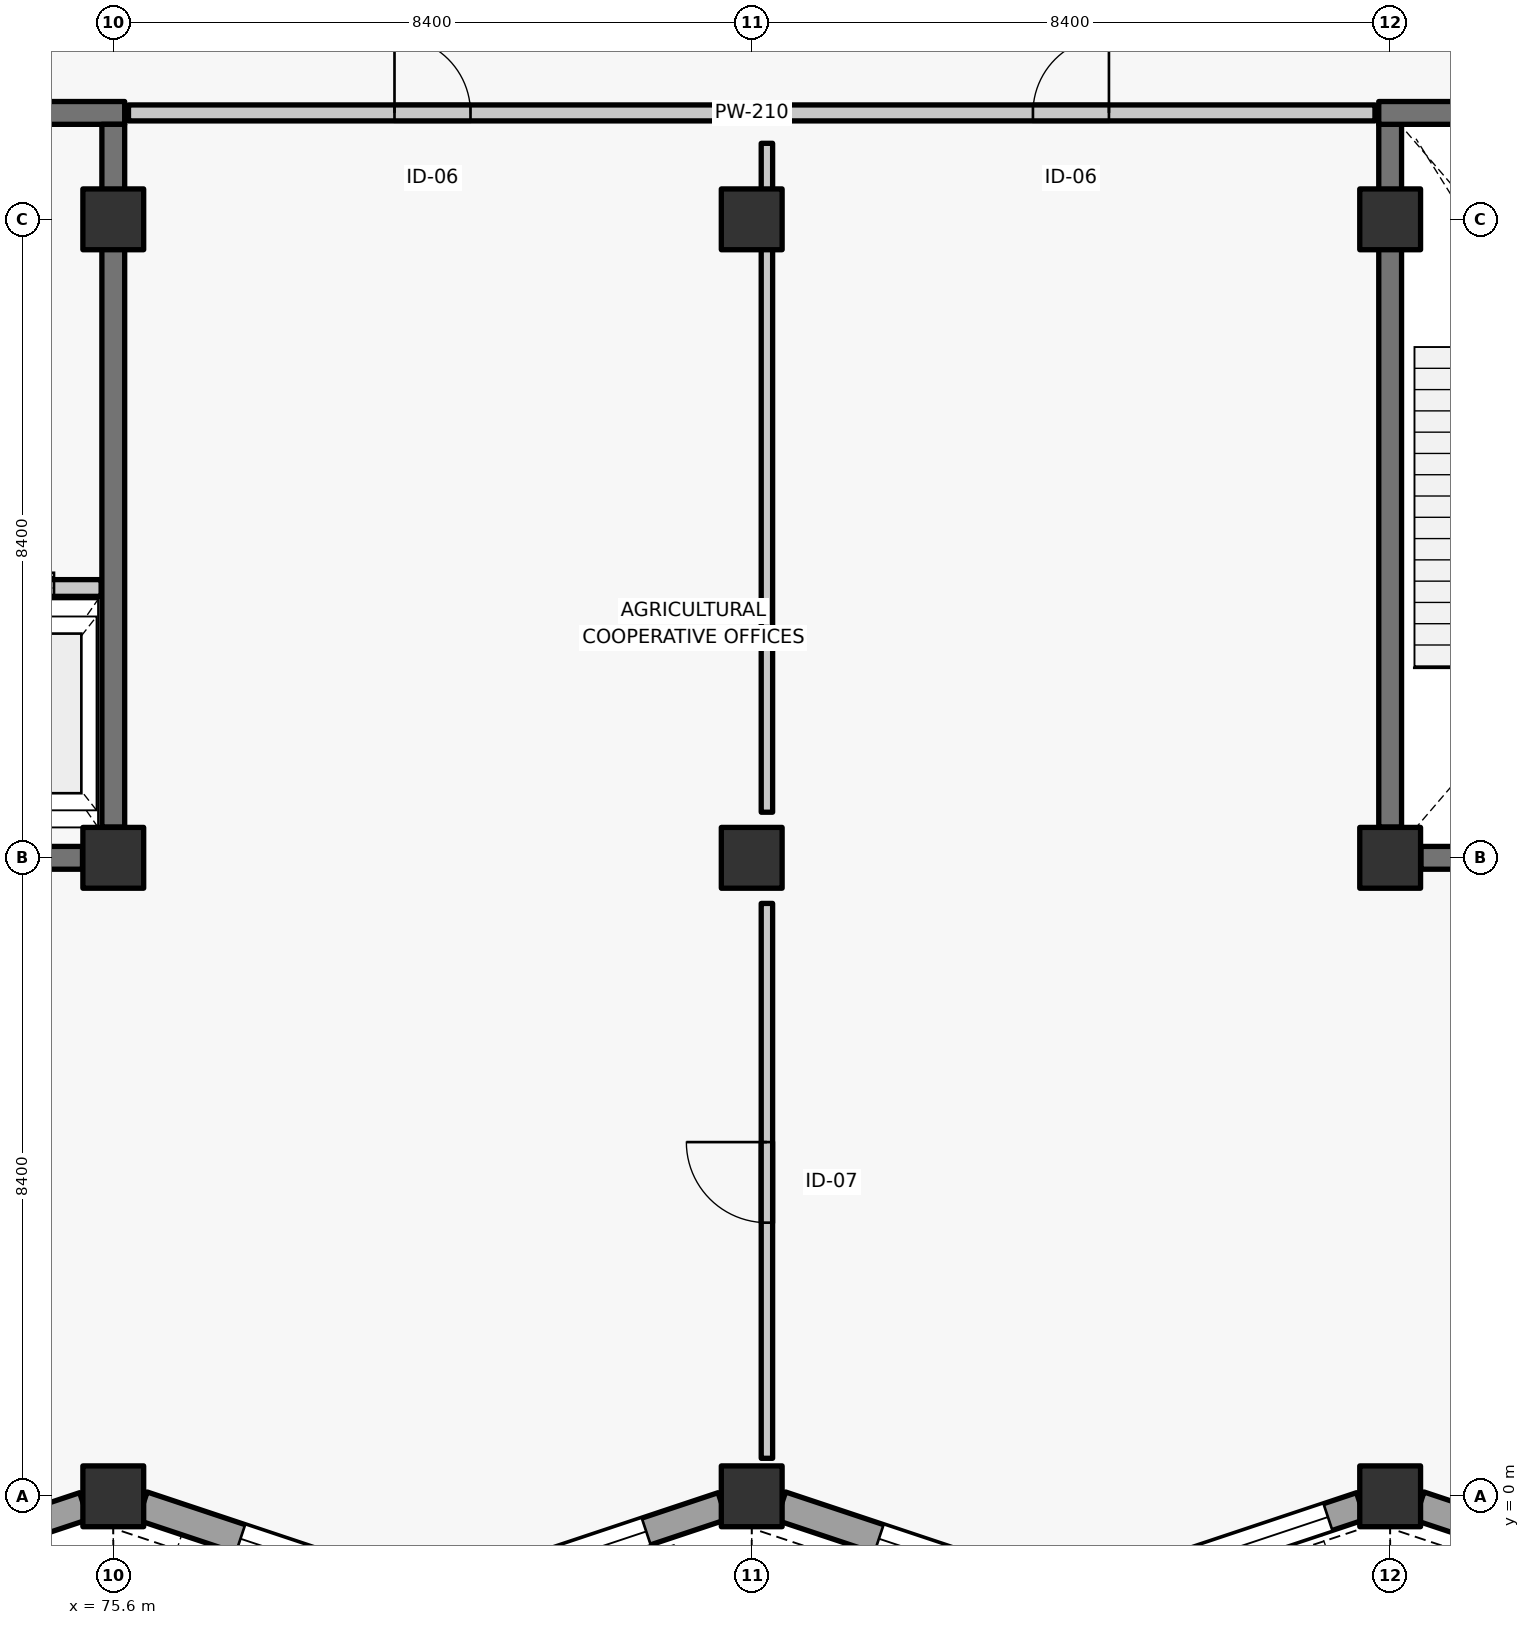
"""IFC4 building model, lengths in metres.
Left out: names, types, materials, properties, quantities, classifications, styles, units other than length and angle.
Written with IfcOpenShell. Run it as: python <this file> out.ifc"""

import sys

from ifc_helpers import new_model, si_unit, direction, frame, frame_2d, origin, origin_2d, place, context, subcontext, project, spatial, rectangle, extrude, element, fill, save


model = new_model("IFC4")
c1 = context("Model", 3, precision=1e-05, world=origin(), true_north=direction((0.0, 1.0)))
c2 = subcontext(c1, "Body", "Model", "MODEL_VIEW")
j1 = project(units=[si_unit("LENGTHUNIT", "METRE"), si_unit("PLANEANGLEUNIT", "RADIAN")], contexts=[c1])
p1 = place(None, origin())
s1 = spatial("IfcSite", under=j1, at=p1, CompositionType="ELEMENT")
p2 = place(p1, origin())
s2 = spatial("IfcBuilding", under=s1, at=p2, CompositionType="ELEMENT")
p3 = place(p2, frame((0.0, 0.0, 6.0)))
s3 = spatial("IfcBuildingStorey", under=s2, at=p3, CompositionType="ELEMENT", Elevation=6.0)
for number, where, z_axis, x_axis in (
    (1, (75.6, 0.0, 0.0), (0.0, 0.0, 1.0), (1.0, 0.0, 0.0)),
    (2, (75.6, 8.4, 0.0), (0.0, 0.0, 1.0), (1.0, 0.0, 0.0)),
    (3, (75.6, 16.8, 0.0), (0.0, 0.0, 1.0), (1.0, 0.0, 0.0)),
    (4, (84.0, 0.0, 0.0), (0.0, 0.0, 1.0), (1.0, 0.0, 0.0)),
    (5, (84.0, 8.4, 0.0), (0.0, 0.0, 1.0), (1.0, 0.0, 0.0)),
    (6, (84.0, 16.8, 0.0), (0.0, 0.0, 1.0), (1.0, 0.0, 0.0)),
    (7, (92.4, 0.0, 0.0), (0.0, 0.0, 1.0), (1.0, 0.0, 0.0)),
    (8, (92.4, 8.4, 0.0), (0.0, 0.0, 1.0), (1.0, 0.0, 0.0)),
    (9, (92.4, 16.8, 0.0), (0.0, 0.0, 1.0), (1.0, 0.0, 0.0)),
):
    element("IfcColumn", number, at=place(p3, frame(where, z_axis=z_axis, x_axis=x_axis)), inside=s3, PredefinedType="COLUMN", context=c2, shape_type="SweptSolid", body=[
        extrude(rectangle(XDim=0.8, YDim=0.8, at=origin_2d()), origin(), (0.0, 0.0, 1.0), 5.4),
    ])
p4 = place(p3, frame((75.216, -0.128, 0.0), z_axis=(0.0, 0.0, 1.0), x_axis=(-0.94870150572, -0.316173137767, 0.0)))
e10 = element("IfcWall", 10, at=p4, inside=s3, PredefinedType="SOLIDWALL", context=c2, shape_type="SweptSolid", body=[
    extrude(rectangle(XDim=4.022, YDim=0.37, at=frame_2d((2.011, 0.0))), origin(), (0.0, 0.0, 1.0), 5.12),
])
p5 = place(p4, frame((0.948, 0.0, 0.9)))
e11 = element("IfcOpeningElement", 11, at=p5, cuts=e10, PredefinedType="OPENING", context=c2, shape_type="SweptSolid", body=[
    extrude(rectangle(XDim=1.72, YDim=1.7, at=frame_2d((0.86, 0.85))), frame((0.0, 0.195, 0.0), z_axis=(0.0, -1.0, 0.0), x_axis=(1.0, 0.0, 0.0)), (0.0, 0.0, 1.0), 0.39),
])
p6 = place(p3, frame((79.8, -1.4, 0.0), z_axis=(0.0, 0.0, 1.0), x_axis=(-0.94870150572, 0.316173137767, 0.0)))
e12 = element("IfcWall", 12, at=p6, inside=s3, PredefinedType="SOLIDWALL", context=c2, shape_type="SweptSolid", body=[
    extrude(rectangle(XDim=4.022, YDim=0.39, at=frame_2d((2.011, 0.0))), origin(), (0.0, 0.0, 1.0), 5.12),
])
p7 = place(p6, frame((1.763, 0.0, 0.9)))
e13 = element("IfcOpeningElement", 13, at=p7, cuts=e12, PredefinedType="OPENING", context=c2, shape_type="SweptSolid", body=[
    extrude(rectangle(XDim=0.9, YDim=2.1, at=frame_2d((0.45, 1.05))), frame((0.0, 0.205, 0.0), z_axis=(0.0, -1.0, 0.0), x_axis=(1.0, 0.0, 0.0)), (0.0, 0.0, 1.0), 0.41),
])
p8 = place(p3, frame((83.616, -0.128, 0.0), z_axis=(0.0, 0.0, 1.0), x_axis=(-0.948695437545, -0.316191345203, 0.0)))
e14 = element("IfcWall", 14, at=p8, inside=s3, PredefinedType="SOLIDWALL", context=c2, shape_type="SweptSolid", body=[
    extrude(rectangle(XDim=4.022, YDim=0.37, at=frame_2d((2.011, 0.0))), origin(), (0.0, 0.0, 1.0), 5.12),
])
p9 = place(p8, frame((1.058, 0.0, 0.9)))
e15 = element("IfcOpeningElement", 15, at=p9, cuts=e14, PredefinedType="OPENING", context=c2, shape_type="SweptSolid", body=[
    extrude(rectangle(XDim=1.5, YDim=2.15, at=frame_2d((0.75, 1.075))), frame((0.0, 0.195, 0.0), z_axis=(0.0, -1.0, 0.0), x_axis=(1.0, 0.0, 0.0)), (0.0, 0.0, 1.0), 0.39),
])
p10 = place(p3, frame((88.2, -1.4, 0.0), z_axis=(0.0, 0.0, 1.0), x_axis=(-0.948695437545, 0.316191345203, 0.0)))
e16 = element("IfcWall", 16, at=p10, inside=s3, PredefinedType="SOLIDWALL", context=c2, shape_type="SweptSolid", body=[
    extrude(rectangle(XDim=4.022, YDim=0.39, at=frame_2d((2.011, 0.0))), origin(), (0.0, 0.0, 1.0), 5.12),
])
p11 = place(p10, frame((1.763, 0.0, 0.9)))
e17 = element("IfcOpeningElement", 17, at=p11, cuts=e16, PredefinedType="OPENING", context=c2, shape_type="SweptSolid", body=[
    extrude(rectangle(XDim=0.9, YDim=2.1, at=frame_2d((0.45, 1.05))), frame((0.0, 0.205, 0.0), z_axis=(0.0, -1.0, 0.0), x_axis=(1.0, 0.0, 0.0)), (0.0, 0.0, 1.0), 0.41),
])
p12 = place(p3, frame((92.016, -0.128, 0.0), z_axis=(0.0, 0.0, 1.0), x_axis=(-0.94870150572, -0.316173137767, 0.0)))
e18 = element("IfcWall", 18, at=p12, inside=s3, PredefinedType="SOLIDWALL", context=c2, shape_type="SweptSolid", body=[
    extrude(rectangle(XDim=4.022, YDim=0.37, at=frame_2d((2.011, 0.0))), origin(), (0.0, 0.0, 1.0), 5.12),
])
p13 = place(p12, frame((0.458, 0.0, 0.9)))
e19 = element("IfcOpeningElement", 19, at=p13, cuts=e18, PredefinedType="OPENING", context=c2, shape_type="SweptSolid", body=[
    extrude(rectangle(XDim=2.7, YDim=1.75, at=frame_2d((1.35, 0.875))), frame((0.0, 0.195, 0.0), z_axis=(0.0, -1.0, 0.0), x_axis=(1.0, 0.0, 0.0)), (0.0, 0.0, 1.0), 0.39),
])
p14 = place(p3, frame((96.6, -1.4, 0.0), z_axis=(0.0, 0.0, 1.0), x_axis=(-0.94870150572, 0.316173137767, 0.0)))
e20 = element("IfcWall", 20, at=p14, inside=s3, PredefinedType="SOLIDWALL", context=c2, shape_type="SweptSolid", body=[
    extrude(rectangle(XDim=4.022, YDim=0.39, at=frame_2d((2.011, 0.0))), origin(), (0.0, 0.0, 1.0), 5.12),
])
p15 = place(p14, frame((1.763, 0.0, 0.9)))
e21 = element("IfcOpeningElement", 21, at=p15, cuts=e20, PredefinedType="OPENING", context=c2, shape_type="SweptSolid", body=[
    extrude(rectangle(XDim=0.9, YDim=2.1, at=frame_2d((0.45, 1.05))), frame((0.0, 0.205, 0.0), z_axis=(0.0, -1.0, 0.0), x_axis=(1.0, 0.0, 0.0)), (0.0, 0.0, 1.0), 0.41),
])
p16 = place(p3, frame((75.195, 8.4, 0.0), z_axis=(0.0, 0.0, 1.0), x_axis=(-1.0, 0.0, 0.0)))
e22 = element("IfcWall", 22, at=p16, inside=s3, PredefinedType="SHEAR", context=c2, shape_type="SweptSolid", body=[
    extrude(rectangle(XDim=7.59, YDim=0.3, at=frame_2d((3.795, 0.0))), origin(), (0.0, 0.0, 1.0), 5.12),
])
p17 = place(p3, frame((67.05, 18.2, 0.0), z_axis=(0.0, 0.0, 1.0), x_axis=(1.0, 0.0, 0.0)))
e23 = element("IfcWall", 23, at=p17, inside=s3, PredefinedType="SHEAR", context=c2, shape_type="SweptSolid", body=[
    extrude(rectangle(XDim=8.7, YDim=0.3, at=frame_2d((4.35, 0.0))), origin(), (0.0, 0.0, 1.0), 5.12),
])
p18 = place(p17, frame((5.57, 0.0, 0.0)))
e24 = element("IfcOpeningElement", 24, at=p18, cuts=e23, PredefinedType="OPENING", context=c2, shape_type="SweptSolid", body=[
    extrude(rectangle(XDim=1.96, YDim=2.2, at=frame_2d((0.98, 1.1))), frame((0.0, 0.16, 0.0), z_axis=(0.0, -1.0, 0.0), x_axis=(1.0, 0.0, 0.0)), (0.0, 0.0, 1.0), 0.32),
])
p19 = place(p3, frame((75.6, 18.05, 0.0), z_axis=(0.0, 0.0, 1.0), x_axis=(0.0, -1.0, 0.0)))
e25 = element("IfcWall", 25, at=p19, inside=s3, PredefinedType="SHEAR", context=c2, shape_type="SweptSolid", body=[
    extrude(rectangle(XDim=9.245, YDim=0.3, at=frame_2d((4.623, 0.0))), origin(), (0.0, 0.0, 1.0), 5.12),
])
p20 = place(p3, frame((73.1, 11.95, 0.0), z_axis=(0.0, 0.0, 1.0), x_axis=(1.0, 0.0, 0.0)))
e26 = element("IfcWall", 26, at=p20, inside=s3, PredefinedType="SOLIDWALL", context=c2, shape_type="SweptSolid", body=[
    extrude(rectangle(XDim=2.34, YDim=0.22, at=frame_2d((1.17, 0.0))), origin(), (0.0, 0.0, 1.0), 5.12),
])
p21 = place(p20, frame((0.62, 0.0, 0.0)))
e27 = element("IfcOpeningElement", 27, at=p21, cuts=e26, PredefinedType="OPENING", context=c2, shape_type="SweptSolid", body=[
    extrude(rectangle(XDim=1.1, YDim=2.2, at=frame_2d((0.55, 1.1))), frame((0.0, 0.12, 0.0), z_axis=(0.0, -1.0, 0.0), x_axis=(1.0, 0.0, 0.0)), (0.0, 0.0, 1.0), 0.24),
])
p22 = place(p3, frame((100.395, 8.4, 0.0), z_axis=(0.0, 0.0, 1.0), x_axis=(-1.0, 0.0, 0.0)))
e28 = element("IfcWall", 28, at=p22, inside=s3, PredefinedType="SHEAR", context=c2, shape_type="SweptSolid", body=[
    extrude(rectangle(XDim=7.59, YDim=0.3, at=frame_2d((3.795, 0.0))), origin(), (0.0, 0.0, 1.0), 5.12),
])
p23 = place(p3, frame((92.4, 8.805, 0.0), z_axis=(0.0, 0.0, 1.0), x_axis=(0.0, 1.0, 0.0)))
e29 = element("IfcWall", 29, at=p23, inside=s3, PredefinedType="SHEAR", context=c2, shape_type="SweptSolid", body=[
    extrude(rectangle(XDim=9.245, YDim=0.3, at=frame_2d((4.623, 0.0))), origin(), (0.0, 0.0, 1.0), 5.12),
])
p24 = place(p3, frame((92.25, 18.2, 0.0), z_axis=(0.0, 0.0, 1.0), x_axis=(1.0, 0.0, 0.0)))
e30 = element("IfcWall", 30, at=p24, inside=s3, PredefinedType="SHEAR", context=c2, shape_type="SweptSolid", body=[
    extrude(rectangle(XDim=8.7, YDim=0.3, at=frame_2d((4.35, 0.0))), origin(), (0.0, 0.0, 1.0), 5.12),
])
p25 = place(p24, frame((5.57, 0.0, 0.0)))
e31 = element("IfcOpeningElement", 31, at=p25, cuts=e30, PredefinedType="OPENING", context=c2, shape_type="SweptSolid", body=[
    extrude(rectangle(XDim=1.96, YDim=2.2, at=frame_2d((0.98, 1.1))), frame((0.0, 0.16, 0.0), z_axis=(0.0, -1.0, 0.0), x_axis=(1.0, 0.0, 0.0)), (0.0, 0.0, 1.0), 0.32),
])
p26 = place(p3, frame((75.8, 18.2, 0.0), z_axis=(0.0, 0.0, 1.0), x_axis=(1.0, 0.0, 0.0)))
e32 = element("IfcWall", 32, at=p26, inside=s3, PredefinedType="PARTITIONING", context=c2, shape_type="SweptSolid", body=[
    extrude(rectangle(XDim=16.4, YDim=0.21, at=frame_2d((8.2, 0.0))), origin(), (0.0, 0.0, 1.0), 5.12),
])
p27 = place(p26, frame((3.5, 0.0, 0.0)))
e33 = element("IfcOpeningElement", 33, at=p27, cuts=e32, PredefinedType="OPENING", context=c2, shape_type="SweptSolid", body=[
    extrude(rectangle(XDim=1.0, YDim=2.15, at=frame_2d((0.5, 1.075))), frame((0.0, 0.115, 0.0), z_axis=(0.0, -1.0, 0.0), x_axis=(1.0, 0.0, 0.0)), (0.0, 0.0, 1.0), 0.23),
])
p28 = place(p26, frame((11.9, 0.0, 0.0)))
e34 = element("IfcOpeningElement", 34, at=p28, cuts=e32, PredefinedType="OPENING", context=c2, shape_type="SweptSolid", body=[
    extrude(rectangle(XDim=1.0, YDim=2.15, at=frame_2d((0.5, 1.075))), frame((0.0, 0.115, 0.0), z_axis=(0.0, -1.0, 0.0), x_axis=(1.0, 0.0, 0.0)), (0.0, 0.0, 1.0), 0.23),
])
p29 = place(p3, frame((84.2, 0.5, 0.0), z_axis=(0.0, 0.0, 1.0), x_axis=(0.0, 1.0, 0.0)))
e35 = element("IfcWall", 35, at=p29, inside=s3, PredefinedType="PARTITIONING", context=c2, shape_type="SweptSolid", body=[
    extrude(rectangle(XDim=7.3, YDim=0.15, at=frame_2d((3.65, 0.0))), origin(), (0.0, 0.0, 1.0), 5.12),
])
p30 = place(p29, frame((3.1, 0.0, 0.0)))
e36 = element("IfcOpeningElement", 36, at=p30, cuts=e35, PredefinedType="OPENING", context=c2, shape_type="SweptSolid", body=[
    extrude(rectangle(XDim=1.06, YDim=2.18, at=frame_2d((0.53, 1.09))), frame((0.0, 0.085, 0.0), z_axis=(0.0, -1.0, 0.0), x_axis=(1.0, 0.0, 0.0)), (0.0, 0.0, 1.0), 0.17),
])
p31 = place(p3, frame((84.2, 9.0, 0.0), z_axis=(0.0, 0.0, 1.0), x_axis=(0.0, 1.0, 0.0)))
e37 = element("IfcWall", 37, at=p31, inside=s3, PredefinedType="PARTITIONING", context=c2, shape_type="SweptSolid", body=[
    extrude(rectangle(XDim=8.8, YDim=0.15, at=frame_2d((4.4, 0.0))), origin(), (0.0, 0.0, 1.0), 5.12),
])
p32 = place(p7, origin())
e38 = element("IfcWindow", 38, at=p32, inside=s3, PartitioningType="SINGLE_PANEL", PredefinedType="WINDOW", context=c2, shape_type="SweptSolid", body=[
    extrude(rectangle(XDim=0.9, YDim=2.1, at=frame_2d((0.45, 1.05))), frame((0.0, 0.03, 0.0), z_axis=(0.0, -1.0, 0.0), x_axis=(1.0, 0.0, 0.0)), (0.0, 0.0, 1.0), 0.06),
])
fill(e13, e38)
p33 = place(p9, origin())
e39 = element("IfcWindow", 39, at=p33, inside=s3, PartitioningType="SINGLE_PANEL", PredefinedType="WINDOW", context=c2, shape_type="SweptSolid", body=[
    extrude(rectangle(XDim=1.5, YDim=2.15, at=frame_2d((0.75, 1.075))), frame((0.0, 0.03, 0.0), z_axis=(0.0, -1.0, 0.0), x_axis=(1.0, 0.0, 0.0)), (0.0, 0.0, 1.0), 0.06),
])
fill(e15, e39)
p34 = place(p11, origin())
e40 = element("IfcWindow", 40, at=p34, inside=s3, PartitioningType="SINGLE_PANEL", PredefinedType="WINDOW", context=c2, shape_type="SweptSolid", body=[
    extrude(rectangle(XDim=0.9, YDim=2.1, at=frame_2d((0.45, 1.05))), frame((0.0, 0.03, 0.0), z_axis=(0.0, -1.0, 0.0), x_axis=(1.0, 0.0, 0.0)), (0.0, 0.0, 1.0), 0.06),
])
fill(e17, e40)
p35 = place(p13, origin())
e41 = element("IfcWindow", 41, at=p35, inside=s3, PartitioningType="SINGLE_PANEL", PredefinedType="WINDOW", context=c2, shape_type="SweptSolid", body=[
    extrude(rectangle(XDim=2.7, YDim=1.75, at=frame_2d((1.35, 0.875))), frame((0.0, 0.03, 0.0), z_axis=(0.0, -1.0, 0.0), x_axis=(1.0, 0.0, 0.0)), (0.0, 0.0, 1.0), 0.06),
])
fill(e19, e41)
p36 = place(p21, origin())
e42 = element("IfcDoor", 42, at=p36, inside=s3, OperationType="SLIDING_TO_RIGHT", PredefinedType="DOOR", context=c2, shape_type="SweptSolid", body=[
    extrude(rectangle(XDim=1.1, YDim=2.2, at=frame_2d((0.55, 1.1))), frame((0.0, 0.025, 0.0), z_axis=(0.0, -1.0, 0.0), x_axis=(1.0, 0.0, 0.0)), (0.0, 0.0, 1.0), 0.05),
])
fill(e27, e42)
p37 = place(p27, origin())
e43 = element("IfcDoor", 43, at=p37, inside=s3, OperationType="SINGLE_SWING_LEFT", PredefinedType="DOOR", context=c2, shape_type="SweptSolid", body=[
    extrude(rectangle(XDim=1.0, YDim=2.15, at=frame_2d((0.5, 1.075))), frame((0.0, 0.025, 0.0), z_axis=(0.0, -1.0, 0.0), x_axis=(1.0, 0.0, 0.0)), (0.0, 0.0, 1.0), 0.05),
])
fill(e33, e43)
p38 = place(p28, origin())
e44 = element("IfcDoor", 44, at=p38, inside=s3, OperationType="SINGLE_SWING_RIGHT", PredefinedType="DOOR", context=c2, shape_type="SweptSolid", body=[
    extrude(rectangle(XDim=1.0, YDim=2.15, at=frame_2d((0.5, 1.075))), frame((0.0, 0.025, 0.0), z_axis=(0.0, -1.0, 0.0), x_axis=(1.0, 0.0, 0.0)), (0.0, 0.0, 1.0), 0.05),
])
fill(e34, e44)
p39 = place(p30, origin())
e45 = element("IfcDoor", 45, at=p39, inside=s3, OperationType="SINGLE_SWING_RIGHT", PredefinedType="DOOR", context=c2, shape_type="SweptSolid", body=[
    extrude(rectangle(XDim=1.06, YDim=2.18, at=frame_2d((0.53, 1.09))), frame((0.0, 0.025, 0.0), z_axis=(0.0, -1.0, 0.0), x_axis=(1.0, 0.0, 0.0)), (0.0, 0.0, 1.0), 0.05),
])
fill(e36, e45)
save(model, sys.argv[1])
